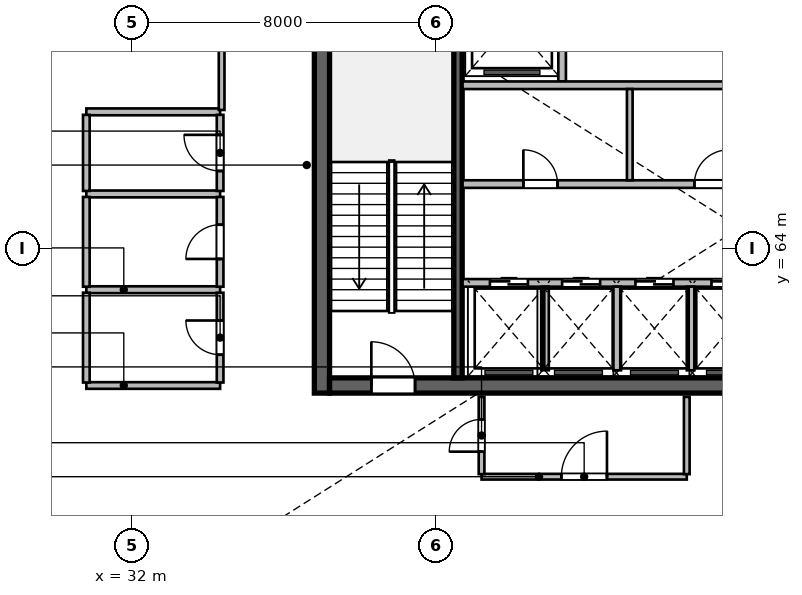
"""IFC4 building model, lengths in metres.
Left out: names, types, materials, properties, quantities, classifications, styles, units other than length and angle.
Written with IfcOpenShell. Run it as: python <this file> out.ifc"""

import sys

from ifc_helpers import new_model, si_unit, direction, frame, frame_2d, origin, place, context, subcontext, project, spatial, rectangle, extrude, source, transform, mapped, element, fill, save


model = new_model("IFC4")
c1 = context("Model", 3, precision=1e-05, world=origin(), true_north=direction((0.0, 1.0)))
c2 = subcontext(c1, "Body", "Model", "MODEL_VIEW")
j1 = project(units=[si_unit("LENGTHUNIT", "METRE"), si_unit("PLANEANGLEUNIT", "RADIAN")], contexts=[c1])
p1 = place(None, origin())
s1 = spatial("IfcSite", under=j1, at=p1, CompositionType="ELEMENT")
p2 = place(p1, origin())
s2 = spatial("IfcBuilding", under=s1, at=p2, CompositionType="ELEMENT")
p3 = place(p2, frame((0.0, 0.0, 312.6)))
s3 = spatial("IfcBuildingStorey", under=s2, at=p3, CompositionType="ELEMENT", Elevation=312.6)
m1 = source(origin(), c2, "Body", "SweptSolid", [
    extrude(rectangle(XDim=12.0, YDim=0.4, at=frame_2d((6.0, 0.0))), origin(), (0.0, 0.0, 1.0), 5.4),
])
p4 = place(p3, frame((37.0, 60.2, 0.0), z_axis=(0.0, 0.0, 1.0), x_axis=(0.0, 1.0, 0.0)))
e1 = element("IfcWall", 1, at=p4, inside=s3, PredefinedType="SHEAR", context=c2, shape_type="MappedRepresentation", body=[
    mapped(m1, transform((0.0, 0.0, 0.0), scale=1.0)),
])
m2 = source(origin(), c2, "Body", "SweptSolid", [
    extrude(rectangle(XDim=21.6, YDim=0.4, at=frame_2d((10.8, 0.0))), origin(), (0.0, 0.0, 1.0), 5.4),
])
p5 = place(p3, frame((37.2, 60.4, 0.0), z_axis=(0.0, 0.0, 1.0), x_axis=(1.0, 0.0, 0.0)))
e2 = element("IfcWall", 2, at=p5, inside=s3, PredefinedType="SHEAR", context=c2, shape_type="MappedRepresentation", body=[
    mapped(m2, transform((0.0, 0.0, 0.0), scale=1.0)),
])
p6 = place(p5, frame((1.1, 0.0, 0.0)))
e3 = element("IfcOpeningElement", 3, at=p6, cuts=e2, PredefinedType="OPENING", context=c2, shape_type="SweptSolid", body=[
    extrude(rectangle(XDim=1.15, YDim=2.15, at=frame_2d((0.575, 1.075))), frame((0.0, 0.21, 0.0), z_axis=(0.0, -1.0, 0.0), x_axis=(1.0, 0.0, 0.0)), (0.0, 0.0, 1.0), 0.42),
])
p7 = place(p5, frame((19.5, 0.0, 0.0)))
e4 = element("IfcOpeningElement", 4, at=p7, cuts=e2, PredefinedType="OPENING", context=c2, shape_type="SweptSolid", body=[
    extrude(rectangle(XDim=0.9, YDim=2.1, at=frame_2d((0.45, 1.05))), frame((0.0, 0.21, 0.0), z_axis=(0.0, -1.0, 0.0), x_axis=(1.0, 0.0, 0.0)), (0.0, 0.0, 1.0), 0.42),
])
p8 = place(p5, frame((12.02, 0.0, 0.0)))
e5 = element("IfcOpeningElement", 5, at=p8, cuts=e2, PredefinedType="OPENING", context=c2, shape_type="SweptSolid", body=[
    extrude(rectangle(XDim=1.6, YDim=2.15, at=frame_2d((0.8, 1.075))), frame((0.0, 0.21, 0.0), z_axis=(0.0, -1.0, 0.0), x_axis=(1.0, 0.0, 0.0)), (0.0, 0.0, 1.0), 0.42),
])
m3 = source(origin(), c2, "Body", "SweptSolid", [
    extrude(rectangle(XDim=11.2, YDim=0.22, at=frame_2d((5.6, 0.0))), origin(), (0.0, 0.0, 1.0), 5.4),
])
p9 = place(p3, frame((40.58, 60.6, 0.0), z_axis=(0.0, 0.0, 1.0), x_axis=(0.0, 1.0, 0.0)))
e6 = element("IfcWall", 6, at=p9, inside=s3, PredefinedType="SHEAR", context=c2, shape_type="MappedRepresentation", body=[
    mapped(m3, transform((0.0, 0.0, 0.0), scale=1.0)),
])
m4 = source(origin(), c2, "Body", "SweptSolid", [
    extrude(rectangle(XDim=5.181, YDim=0.28, at=frame_2d((2.591, 0.0))), origin(), (0.0, 0.0, 1.0), 5.12),
])
p10 = place(p3, frame((27.51, 68.258, 0.0), z_axis=(0.0, 0.0, 1.0), x_axis=(0.568207430175, 0.82288536036, 0.0)))
e7 = element("IfcWall", 7, at=p10, inside=s3, PredefinedType="SOLIDWALL", context=c2, shape_type="MappedRepresentation", body=[
    mapped(m4, transform((0.0, 0.0, 0.0), scale=1.0)),
])
p11 = place(p10, frame((1.491, 0.0, 0.95)))
e8 = element("IfcOpeningElement", 8, at=p11, cuts=e7, PredefinedType="OPENING", context=c2, shape_type="SweptSolid", body=[
    extrude(rectangle(XDim=2.2, YDim=2.1, at=frame_2d((1.1, 1.05))), frame((0.0, 0.15, 0.0), z_axis=(0.0, -1.0, 0.0), x_axis=(1.0, 0.0, 0.0)), (0.0, 0.0, 1.0), 0.3),
])
m5 = source(origin(), c2, "Body", "SweptSolid", [
    extrude(rectangle(XDim=3.2, YDim=0.2, at=frame_2d((1.6, 0.0))), origin(), (0.0, 0.0, 1.0), 5.12),
])
p12 = place(p3, frame((43.32, 68.4, 0.0), z_axis=(0.0, 0.0, 1.0), x_axis=(0.0, 1.0, 0.0)))
e9 = element("IfcWall", 9, at=p12, inside=s3, PredefinedType="SOLIDWALL", context=c2, shape_type="MappedRepresentation", body=[
    mapped(m5, transform((0.0, 0.0, 0.0), scale=1.0)),
])
m6 = source(origin(), c2, "Body", "SweptSolid", [
    extrude(rectangle(XDim=8.8, YDim=0.2, at=frame_2d((4.4, 0.0))), origin(), (0.0, 0.0, 1.0), 5.12),
])
p13 = place(p3, frame((40.7, 68.3, 0.0), z_axis=(0.0, 0.0, 1.0), x_axis=(1.0, 0.0, 0.0)))
e10 = element("IfcWall", 10, at=p13, inside=s3, PredefinedType="SOLIDWALL", context=c2, shape_type="MappedRepresentation", body=[
    mapped(m6, transform((0.0, 0.0, 0.0), scale=1.0)),
])
m7 = source(origin(), c2, "Body", "SweptSolid", [
    extrude(rectangle(XDim=8.02, YDim=0.2, at=frame_2d((4.01, 0.0))), origin(), (0.0, 0.0, 1.0), 5.12),
])
p14 = place(p3, frame((40.7, 63.1, 0.0), z_axis=(0.0, 0.0, 1.0), x_axis=(1.0, 0.0, 0.0)))
e11 = element("IfcWall", 11, at=p14, inside=s3, PredefinedType="SOLIDWALL", context=c2, shape_type="MappedRepresentation", body=[
    mapped(m7, transform((0.0, 0.0, 0.0), scale=1.0)),
])
p15 = place(p14, frame((0.72, 0.0, 0.0)))
e12 = element("IfcOpeningElement", 12, at=p15, cuts=e11, PredefinedType="OPENING", context=c2, shape_type="SweptSolid", body=[
    extrude(rectangle(XDim=1.0, YDim=2.15, at=frame_2d((0.5, 1.075))), frame((0.0, 0.11, 0.0), z_axis=(0.0, -1.0, 0.0), x_axis=(1.0, 0.0, 0.0)), (0.0, 0.0, 1.0), 0.22),
])
p16 = place(p14, frame((2.62, 0.0, 0.0)))
e13 = element("IfcOpeningElement", 13, at=p16, cuts=e11, PredefinedType="OPENING", context=c2, shape_type="SweptSolid", body=[
    extrude(rectangle(XDim=1.0, YDim=2.15, at=frame_2d((0.5, 1.075))), frame((0.0, 0.11, 0.0), z_axis=(0.0, -1.0, 0.0), x_axis=(1.0, 0.0, 0.0)), (0.0, 0.0, 1.0), 0.22),
])
p17 = place(p14, frame((4.55, 0.0, 0.0)))
e14 = element("IfcOpeningElement", 14, at=p17, cuts=e11, PredefinedType="OPENING", context=c2, shape_type="SweptSolid", body=[
    extrude(rectangle(XDim=1.0, YDim=2.15, at=frame_2d((0.5, 1.075))), frame((0.0, 0.11, 0.0), z_axis=(0.0, -1.0, 0.0), x_axis=(1.0, 0.0, 0.0)), (0.0, 0.0, 1.0), 0.22),
])
p18 = place(p14, frame((6.55, 0.0, 0.0)))
e15 = element("IfcOpeningElement", 15, at=p18, cuts=e11, PredefinedType="OPENING", context=c2, shape_type="SweptSolid", body=[
    extrude(rectangle(XDim=1.0, YDim=2.15, at=frame_2d((0.5, 1.075))), frame((0.0, 0.11, 0.0), z_axis=(0.0, -1.0, 0.0), x_axis=(1.0, 0.0, 0.0)), (0.0, 0.0, 1.0), 0.22),
])
m8 = source(origin(), c2, "Body", "SweptSolid", [
    extrude(rectangle(XDim=2.2, YDim=0.2, at=frame_2d((1.1, 0.0))), origin(), (0.0, 0.0, 1.0), 5.12),
])
for number, where, z_axis, x_axis in (
    (16, (42.87, 60.8, 0.0), (0.0, 0.0, 1.0), (0.0, 1.0, 0.0)),
    (17, (44.77, 60.8, 0.0), (0.0, 0.0, 1.0), (0.0, 1.0, 0.0)),
    (18, (46.7, 60.8, 0.0), (0.0, 0.0, 1.0), (0.0, 1.0, 0.0)),
):
    element("IfcWall", number, at=place(p3, frame(where, z_axis=z_axis, x_axis=x_axis)), inside=s3, PredefinedType="SOLIDWALL", context=c2, shape_type="MappedRepresentation", body=[
        mapped(m8, transform((0.0, 0.0, 0.0), scale=1.0)),
    ])
p19 = place(p3, frame((40.7, 65.7, 0.0), z_axis=(0.0, 0.0, 1.0), x_axis=(1.0, 0.0, 0.0)))
e19 = element("IfcWall", 19, at=p19, inside=s3, PredefinedType="SOLIDWALL", context=c2, shape_type="MappedRepresentation", body=[
    mapped(m6, transform((0.0, 0.0, 0.0), scale=1.0)),
])
p20 = place(p19, frame((1.6, 0.0, 0.0)))
e20 = element("IfcOpeningElement", 20, at=p20, cuts=e19, PredefinedType="OPENING", context=c2, shape_type="SweptSolid", body=[
    extrude(rectangle(XDim=0.9, YDim=2.1, at=frame_2d((0.45, 1.05))), frame((0.0, 0.11, 0.0), z_axis=(0.0, -1.0, 0.0), x_axis=(1.0, 0.0, 0.0)), (0.0, 0.0, 1.0), 0.22),
])
p21 = place(p19, frame((6.1, 0.0, 0.0)))
e21 = element("IfcOpeningElement", 21, at=p21, cuts=e19, PredefinedType="OPENING", context=c2, shape_type="SweptSolid", body=[
    extrude(rectangle(XDim=0.9, YDim=2.1, at=frame_2d((0.45, 1.05))), frame((0.0, 0.11, 0.0), z_axis=(0.0, -1.0, 0.0), x_axis=(1.0, 0.0, 0.0)), (0.0, 0.0, 1.0), 0.22),
])
m9 = source(origin(), c2, "Body", "SweptSolid", [
    extrude(rectangle(XDim=2.4, YDim=0.15, at=frame_2d((1.2, 0.0))), origin(), (0.0, 0.0, 1.0), 5.12),
])
p22 = place(p3, frame((45.1, 65.8, 0.0), z_axis=(0.0, 0.0, 1.0), x_axis=(0.0, 1.0, 0.0)))
e22 = element("IfcWall", 22, at=p22, inside=s3, PredefinedType="PARTITIONING", context=c2, shape_type="MappedRepresentation", body=[
    mapped(m9, transform((0.0, 0.0, 0.0), scale=1.0)),
])
m10 = source(origin(), c2, "Body", "SweptSolid", [
    extrude(rectangle(XDim=5.4, YDim=0.15, at=frame_2d((2.7, 0.0))), origin(), (0.0, 0.0, 1.0), 5.12),
])
p23 = place(p3, frame((41.2, 58.0, 0.0), z_axis=(0.0, 0.0, 1.0), x_axis=(1.0, 0.0, 0.0)))
e23 = element("IfcWall", 23, at=p23, inside=s3, PredefinedType="PARTITIONING", context=c2, shape_type="MappedRepresentation", body=[
    mapped(m10, transform((0.0, 0.0, 0.0), scale=1.0)),
])
p24 = place(p23, frame((2.1, 0.0, 0.0)))
e24 = element("IfcOpeningElement", 24, at=p24, cuts=e23, PredefinedType="OPENING", context=c2, shape_type="SweptSolid", body=[
    extrude(rectangle(XDim=1.2, YDim=2.15, at=frame_2d((0.6, 1.075))), frame((0.0, 0.085, 0.0), z_axis=(0.0, -1.0, 0.0), x_axis=(1.0, 0.0, 0.0)), (0.0, 0.0, 1.0), 0.17),
])
m11 = source(origin(), c2, "Body", "SweptSolid", [
    extrude(rectangle(XDim=2.033, YDim=0.15, at=frame_2d((1.016, 0.0))), origin(), (0.0, 0.0, 1.0), 5.12),
])
p25 = place(p3, frame((41.2, 58.067, 0.0), z_axis=(0.0, 0.0, 1.0), x_axis=(0.0, 1.0, 0.0)))
e25 = element("IfcWall", 25, at=p25, inside=s3, PredefinedType="PARTITIONING", context=c2, shape_type="MappedRepresentation", body=[
    mapped(m11, transform((0.0, 0.0, 0.0), scale=1.0)),
])
p26 = place(p25, frame((0.591, 0.0, 0.0)))
e26 = element("IfcOpeningElement", 26, at=p26, cuts=e25, PredefinedType="OPENING", context=c2, shape_type="SweptSolid", body=[
    extrude(rectangle(XDim=0.85, YDim=2.1, at=frame_2d((0.425, 1.05))), frame((0.0, 0.085, 0.0), z_axis=(0.0, -1.0, 0.0), x_axis=(1.0, 0.0, 0.0)), (0.0, 0.0, 1.0), 0.17),
])
p27 = place(p3, frame((46.6, 58.067, 0.0), z_axis=(0.0, 0.0, 1.0), x_axis=(0.0, 1.0, 0.0)))
e27 = element("IfcWall", 27, at=p27, inside=s3, PredefinedType="PARTITIONING", context=c2, shape_type="MappedRepresentation", body=[
    mapped(m11, transform((0.0, 0.0, 0.0), scale=1.0)),
])
m12 = source(origin(), c2, "Body", "SweptSolid", [
    extrude(rectangle(XDim=3.52, YDim=0.175, at=frame_2d((1.76, 0.0))), origin(), (0.0, 0.0, 1.0), 5.12),
])
p28 = place(p3, frame((30.8, 60.4, 0.0), z_axis=(0.0, 0.0, 1.0), x_axis=(1.0, 0.0, 0.0)))
e28 = element("IfcWall", 28, at=p28, inside=s3, PredefinedType="PARTITIONING", context=c2, shape_type="MappedRepresentation", body=[
    mapped(m12, transform((0.0, 0.0, 0.0), scale=1.0)),
])
m13 = source(origin(), c2, "Body", "SweptSolid", [
    extrude(rectangle(XDim=3.52, YDim=0.18, at=frame_2d((1.76, 0.0))), origin(), (0.0, 0.0, 1.0), 5.12),
])
p29 = place(p3, frame((30.8, 62.92, 0.0), z_axis=(0.0, 0.0, 1.0), x_axis=(1.0, 0.0, 0.0)))
e29 = element("IfcWall", 29, at=p29, inside=s3, PredefinedType="PLUMBINGWALL", context=c2, shape_type="MappedRepresentation", body=[
    mapped(m13, transform((0.0, 0.0, 0.0), scale=1.0)),
])
m14 = source(origin(), c2, "Body", "SweptSolid", [
    extrude(rectangle(XDim=2.363, YDim=0.175, at=frame_2d((1.181, 0.0))), origin(), (0.0, 0.0, 1.0), 5.12),
])
p30 = place(p3, frame((30.8, 60.479, 0.0), z_axis=(0.0, 0.0, 1.0), x_axis=(0.0, 1.0, 0.0)))
e30 = element("IfcWall", 30, at=p30, inside=s3, PredefinedType="PARTITIONING", context=c2, shape_type="MappedRepresentation", body=[
    mapped(m14, transform((0.0, 0.0, 0.0), scale=1.0)),
])
p31 = place(p3, frame((34.32, 60.479, 0.0), z_axis=(0.0, 0.0, 1.0), x_axis=(0.0, 1.0, 0.0)))
e31 = element("IfcWall", 31, at=p31, inside=s3, PredefinedType="PARTITIONING", context=c2, shape_type="MappedRepresentation", body=[
    mapped(m14, transform((0.0, 0.0, 0.0), scale=1.0)),
])
p32 = place(p31, frame((0.731, 0.0, 0.0)))
e32 = element("IfcOpeningElement", 32, at=p32, cuts=e31, PredefinedType="OPENING", context=c2, shape_type="SweptSolid", body=[
    extrude(rectangle(XDim=0.9, YDim=2.08, at=frame_2d((0.45, 1.04))), frame((0.0, 0.098, 0.0), z_axis=(0.0, -1.0, 0.0), x_axis=(1.0, 0.0, 0.0)), (0.0, 0.0, 1.0), 0.195),
])
p33 = place(p3, frame((30.8, 65.44, 0.0), z_axis=(0.0, 0.0, 1.0), x_axis=(1.0, 0.0, 0.0)))
e33 = element("IfcWall", 33, at=p33, inside=s3, PredefinedType="PLUMBINGWALL", context=c2, shape_type="MappedRepresentation", body=[
    mapped(m13, transform((0.0, 0.0, 0.0), scale=1.0)),
])
m15 = source(origin(), c2, "Body", "SweptSolid", [
    extrude(rectangle(XDim=2.362, YDim=0.175, at=frame_2d((1.181, 0.0))), origin(), (0.0, 0.0, 1.0), 5.12),
])
p34 = place(p3, frame((30.8, 62.999, 0.0), z_axis=(0.0, 0.0, 1.0), x_axis=(0.0, 1.0, 0.0)))
e34 = element("IfcWall", 34, at=p34, inside=s3, PredefinedType="PARTITIONING", context=c2, shape_type="MappedRepresentation", body=[
    mapped(m15, transform((0.0, 0.0, 0.0), scale=1.0)),
])
p35 = place(p3, frame((34.32, 62.999, 0.0), z_axis=(0.0, 0.0, 1.0), x_axis=(0.0, 1.0, 0.0)))
e35 = element("IfcWall", 35, at=p35, inside=s3, PredefinedType="PARTITIONING", context=c2, shape_type="MappedRepresentation", body=[
    mapped(m15, transform((0.0, 0.0, 0.0), scale=1.0)),
])
p36 = place(p35, frame((0.731, 0.0, 0.0)))
e36 = element("IfcOpeningElement", 36, at=p36, cuts=e35, PredefinedType="OPENING", context=c2, shape_type="SweptSolid", body=[
    extrude(rectangle(XDim=0.9, YDim=2.08, at=frame_2d((0.45, 1.04))), frame((0.0, 0.098, 0.0), z_axis=(0.0, -1.0, 0.0), x_axis=(1.0, 0.0, 0.0)), (0.0, 0.0, 1.0), 0.195),
])
p37 = place(p3, frame((30.8, 67.6, 0.0), z_axis=(0.0, 0.0, 1.0), x_axis=(1.0, 0.0, 0.0)))
e37 = element("IfcWall", 37, at=p37, inside=s3, PredefinedType="PLUMBINGWALL", context=c2, shape_type="MappedRepresentation", body=[
    mapped(m13, transform((0.0, 0.0, 0.0), scale=1.0)),
])
m16 = source(origin(), c2, "Body", "SweptSolid", [
    extrude(rectangle(XDim=2.002, YDim=0.175, at=frame_2d((1.001, 0.0))), origin(), (0.0, 0.0, 1.0), 5.12),
])
p38 = place(p3, frame((30.8, 65.519, 0.0), z_axis=(0.0, 0.0, 1.0), x_axis=(0.0, 1.0, 0.0)))
e38 = element("IfcWall", 38, at=p38, inside=s3, PredefinedType="PARTITIONING", context=c2, shape_type="MappedRepresentation", body=[
    mapped(m16, transform((0.0, 0.0, 0.0), scale=1.0)),
])
p39 = place(p3, frame((34.32, 65.519, 0.0), z_axis=(0.0, 0.0, 1.0), x_axis=(0.0, 1.0, 0.0)))
e39 = element("IfcWall", 39, at=p39, inside=s3, PredefinedType="PARTITIONING", context=c2, shape_type="MappedRepresentation", body=[
    mapped(m16, transform((0.0, 0.0, 0.0), scale=1.0)),
])
p40 = place(p39, frame((0.526, 0.0, 0.0)))
e40 = element("IfcOpeningElement", 40, at=p40, cuts=e39, PredefinedType="OPENING", context=c2, shape_type="SweptSolid", body=[
    extrude(rectangle(XDim=0.95, YDim=2.12, at=frame_2d((0.475, 1.06))), frame((0.0, 0.098, 0.0), z_axis=(0.0, -1.0, 0.0), x_axis=(1.0, 0.0, 0.0)), (0.0, 0.0, 1.0), 0.195),
])
m17 = source(origin(), c2, "Body", "SweptSolid", [
    extrude(rectangle(XDim=6.862, YDim=0.15, at=frame_2d((3.431, 0.0))), origin(), (0.0, 0.0, 1.0), 5.12),
])
p41 = place(p3, frame((34.36, 67.65, 0.0), z_axis=(0.0, 0.0, 1.0), x_axis=(0.0, 1.0, 0.0)))
e41 = element("IfcWall", 41, at=p41, inside=s3, PredefinedType="PARTITIONING", context=c2, shape_type="MappedRepresentation", body=[
    mapped(m17, transform((0.0, 0.0, 0.0), scale=1.0)),
])
m18 = source(origin(), c2, "Body", "SweptSolid", [
    extrude(rectangle(XDim=1.15, YDim=2.15, at=frame_2d((0.575, 1.075))), frame((0.0, 0.025, 0.0), z_axis=(0.0, -1.0, 0.0), x_axis=(1.0, 0.0, 0.0)), (0.0, 0.0, 1.0), 0.05),
])
p42 = place(p6, origin())
e42 = element("IfcDoor", 42, at=p42, inside=s3, OperationType="SINGLE_SWING_LEFT", PredefinedType="DOOR", context=c2, shape_type="MappedRepresentation", body=[
    mapped(m18, transform((0.0, 0.0, 0.0), scale=1.0)),
])
fill(e3, e42)
m19 = source(origin(), c2, "Body", "SweptSolid", [
    extrude(rectangle(XDim=1.0, YDim=2.15, at=frame_2d((0.5, 1.075))), frame((0.0, 0.025, 0.0), z_axis=(0.0, -1.0, 0.0), x_axis=(1.0, 0.0, 0.0)), (0.0, 0.0, 1.0), 0.05),
])
p43 = place(p15, origin())
e43 = element("IfcDoor", 43, at=p43, inside=s3, OperationType="DOUBLE_DOOR_SLIDING", PredefinedType="DOOR", context=c2, shape_type="MappedRepresentation", body=[
    mapped(m19, transform((0.0, 0.0, 0.0), scale=1.0)),
])
fill(e12, e43)
p44 = place(p16, origin())
e44 = element("IfcDoor", 44, at=p44, inside=s3, OperationType="DOUBLE_DOOR_SLIDING", PredefinedType="DOOR", context=c2, shape_type="MappedRepresentation", body=[
    mapped(m19, transform((0.0, 0.0, 0.0), scale=1.0)),
])
fill(e13, e44)
p45 = place(p17, origin())
e45 = element("IfcDoor", 45, at=p45, inside=s3, OperationType="DOUBLE_DOOR_SLIDING", PredefinedType="DOOR", context=c2, shape_type="MappedRepresentation", body=[
    mapped(m19, transform((0.0, 0.0, 0.0), scale=1.0)),
])
fill(e14, e45)
p46 = place(p18, origin())
e46 = element("IfcDoor", 46, at=p46, inside=s3, OperationType="DOUBLE_DOOR_SLIDING", PredefinedType="DOOR", context=c2, shape_type="MappedRepresentation", body=[
    mapped(m19, transform((0.0, 0.0, 0.0), scale=1.0)),
])
fill(e15, e46)
m20 = source(origin(), c2, "Body", "SweptSolid", [
    extrude(rectangle(XDim=0.9, YDim=2.1, at=frame_2d((0.45, 1.05))), frame((0.0, 0.025, 0.0), z_axis=(0.0, -1.0, 0.0), x_axis=(1.0, 0.0, 0.0)), (0.0, 0.0, 1.0), 0.05),
])
p47 = place(p20, origin())
e47 = element("IfcDoor", 47, at=p47, inside=s3, OperationType="SINGLE_SWING_LEFT", PredefinedType="DOOR", context=c2, shape_type="MappedRepresentation", body=[
    mapped(m20, transform((0.0, 0.0, 0.0), scale=1.0)),
])
fill(e20, e47)
p48 = place(p21, origin())
e48 = element("IfcDoor", 48, at=p48, inside=s3, OperationType="SINGLE_SWING_RIGHT", PredefinedType="DOOR", context=c2, shape_type="MappedRepresentation", body=[
    mapped(m20, transform((0.0, 0.0, 0.0), scale=1.0)),
])
fill(e21, e48)
m21 = source(origin(), c2, "Body", "SweptSolid", [
    extrude(rectangle(XDim=0.85, YDim=2.1, at=frame_2d((0.425, 1.05))), frame((0.0, 0.025, 0.0), z_axis=(0.0, -1.0, 0.0), x_axis=(1.0, 0.0, 0.0)), (0.0, 0.0, 1.0), 0.05),
])
p49 = place(p26, origin())
e49 = element("IfcDoor", 49, at=p49, inside=s3, OperationType="SINGLE_SWING_LEFT", PredefinedType="DOOR", context=c2, shape_type="MappedRepresentation", body=[
    mapped(m21, transform((0.0, 0.0, 0.0), scale=1.0)),
])
fill(e26, e49)
m22 = source(origin(), c2, "Body", "SweptSolid", [
    extrude(rectangle(XDim=0.9, YDim=2.08, at=frame_2d((0.45, 1.04))), frame((0.0, 0.025, 0.0), z_axis=(0.0, -1.0, 0.0), x_axis=(1.0, 0.0, 0.0)), (0.0, 0.0, 1.0), 0.05),
])
p50 = place(p32, origin())
e50 = element("IfcDoor", 50, at=p50, inside=s3, OperationType="SINGLE_SWING_RIGHT", PredefinedType="DOOR", context=c2, shape_type="MappedRepresentation", body=[
    mapped(m22, transform((0.0, 0.0, 0.0), scale=1.0)),
])
fill(e32, e50)
p51 = place(p36, origin())
e51 = element("IfcDoor", 51, at=p51, inside=s3, OperationType="SINGLE_SWING_LEFT", PredefinedType="DOOR", context=c2, shape_type="MappedRepresentation", body=[
    mapped(m22, transform((0.0, 0.0, 0.0), scale=1.0)),
])
fill(e36, e51)
m23 = source(origin(), c2, "Body", "SweptSolid", [
    extrude(rectangle(XDim=0.95, YDim=2.12, at=frame_2d((0.475, 1.06))), frame((0.0, 0.025, 0.0), z_axis=(0.0, -1.0, 0.0), x_axis=(1.0, 0.0, 0.0)), (0.0, 0.0, 1.0), 0.05),
])
p52 = place(p40, origin())
e52 = element("IfcDoor", 52, at=p52, inside=s3, OperationType="SINGLE_SWING_RIGHT", PredefinedType="DOOR", context=c2, shape_type="MappedRepresentation", body=[
    mapped(m23, transform((0.0, 0.0, 0.0), scale=1.0)),
])
fill(e40, e52)
m24 = source(origin(), c2, "Body", "SweptSolid", [
    extrude(rectangle(XDim=1.2, YDim=2.15, at=frame_2d((0.6, 1.075))), frame((0.0, 0.025, 0.0), z_axis=(0.0, -1.0, 0.0), x_axis=(1.0, 0.0, 0.0)), (0.0, 0.0, 1.0), 0.05),
])
p53 = place(p24, origin())
e53 = element("IfcDoor", 53, at=p53, inside=s3, OperationType="SINGLE_SWING_RIGHT", PredefinedType="DOOR", context=c2, shape_type="MappedRepresentation", body=[
    mapped(m24, transform((0.0, 0.0, 0.0), scale=1.0)),
])
fill(e24, e53)
save(model, sys.argv[1])
